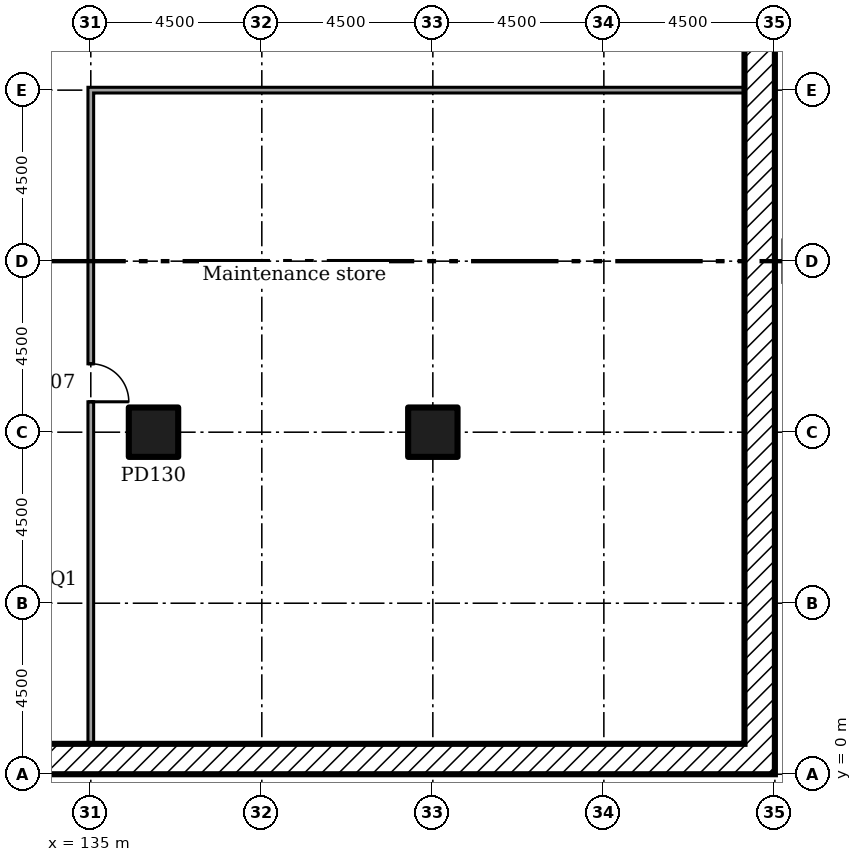
"""IFC4 building model, lengths in metres.
Left out: names, types, materials, properties, quantities, classifications, styles, units other than length and angle.
Written with IfcOpenShell. Run it as: python <this file> out.ifc"""

import sys

from ifc_helpers import new_model, si_unit, direction, frame, frame_2d, origin, origin_2d, place, context, subcontext, project, spatial, rectangle, extrude, element, fill, save


model = new_model("IFC4")
c1 = context("Model", 3, precision=1e-05, world=origin(), true_north=direction((0.0, 1.0)))
c2 = subcontext(c1, "Body", "Model", "MODEL_VIEW")
j1 = project(units=[si_unit("LENGTHUNIT", "METRE"), si_unit("PLANEANGLEUNIT", "RADIAN")], contexts=[c1])
p1 = place(None, origin())
s1 = spatial("IfcSite", under=j1, at=p1, CompositionType="ELEMENT")
p2 = place(p1, origin())
s2 = spatial("IfcBuilding", under=s1, at=p2, CompositionType="ELEMENT")
p3 = place(p2, frame((0.0, 0.0, -8.0)))
s3 = spatial("IfcBuildingStorey", under=s2, at=p3, CompositionType="ELEMENT", Elevation=-8.0)
for number, where in (
    (1, (136.65, 9.0, 0.0)),
    (2, (144.0, 9.0, 0.0)),
):
    element("IfcColumn", number, at=place(p3, frame(where)), inside=s3, PredefinedType="COLUMN", context=c2, shape_type="SweptSolid", body=[
        extrude(rectangle(XDim=1.3, YDim=1.3, at=origin_2d()), origin(), (0.0, 0.0, 1.0), 4.0),
    ])
p4 = place(p3, frame((0.0, 0.4, 0.0)))
e3 = element("IfcWall", 3, at=p4, inside=s3, PredefinedType="SOLIDWALL", context=c2, shape_type="SweptSolid", body=[
    extrude(rectangle(XDim=153.0, YDim=0.8, at=frame_2d((76.5, 0.0))), origin(), (0.0, 0.0, 1.0), 4.0),
])
p5 = place(p3, frame((152.6, 0.8, 0.0), z_axis=(0.0, 0.0, 1.0), x_axis=(0.0, 1.0, 0.0)))
e4 = element("IfcWall", 4, at=p5, inside=s3, PredefinedType="SOLIDWALL", context=c2, shape_type="SweptSolid", body=[
    extrude(rectangle(XDim=97.4, YDim=0.8, at=frame_2d((48.7, 0.0))), origin(), (0.0, 0.0, 1.0), 4.0),
])
p6 = place(p3, frame((135.0, 0.8, 0.0), z_axis=(0.0, 0.0, 1.0), x_axis=(0.0, 1.0, 0.0)))
e5 = element("IfcWall", 5, at=p6, inside=s3, PredefinedType="PARTITIONING", context=c2, shape_type="SweptSolid", body=[
    extrude(rectangle(XDim=17.275, YDim=0.15, at=frame_2d((8.637, 0.0))), origin(), (0.0, 0.0, 1.0), 3.55),
])
p7 = place(p6, frame((9.0, 0.0, 0.0)))
e6 = element("IfcOpeningElement", 6, at=p7, cuts=e5, PredefinedType="OPENING", context=c2, shape_type="SweptSolid", body=[
    extrude(rectangle(XDim=1.0, YDim=2.1, at=frame_2d((0.5, 1.05))), frame((0.0, 0.085, 0.0), z_axis=(0.0, -1.0, 0.0), x_axis=(1.0, 0.0, 0.0)), (0.0, 0.0, 1.0), 0.17),
])
p8 = place(p3, frame((135.075, 18.0, 0.0)))
e7 = element("IfcWall", 7, at=p8, inside=s3, PredefinedType="PARTITIONING", context=c2, shape_type="SweptSolid", body=[
    extrude(rectangle(XDim=17.125, YDim=0.15, at=frame_2d((8.562, 0.0))), origin(), (0.0, 0.0, 1.0), 3.55),
])
p9 = place(p7, frame((1.0, 0.0, 0.0), x_axis=(-1.0, 0.0, 0.0)))
e8 = element("IfcDoor", 8, at=p9, inside=s3, OperationType="SINGLE_SWING_LEFT", PredefinedType="DOOR", context=c2, shape_type="SweptSolid", body=[
    extrude(rectangle(XDim=1.0, YDim=2.1, at=frame_2d((0.5, 1.05))), frame((0.0, 0.025, 0.0), z_axis=(0.0, -1.0, 0.0), x_axis=(1.0, 0.0, 0.0)), (0.0, 0.0, 1.0), 0.05),
])
fill(e6, e8)
save(model, sys.argv[1])
